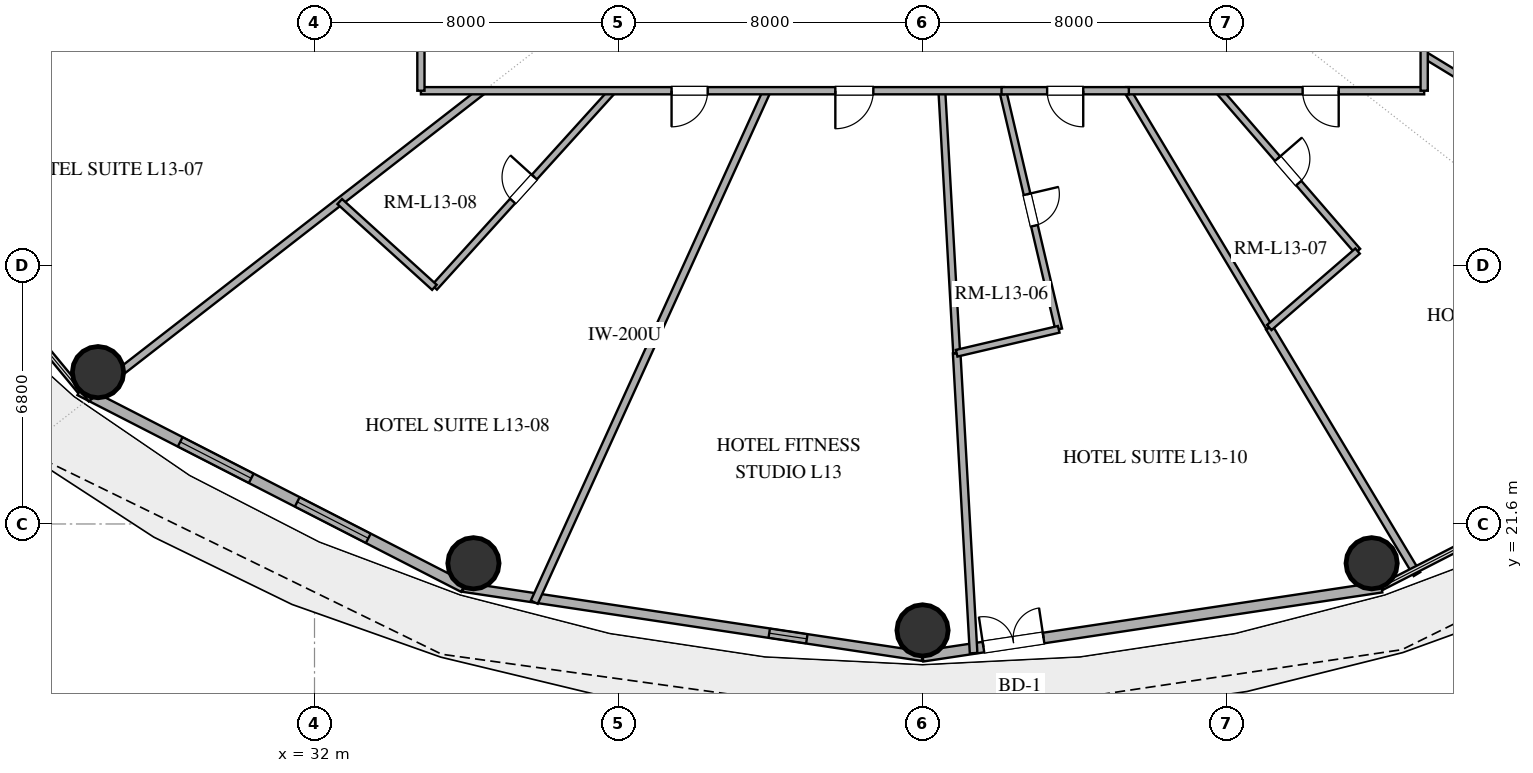
"""IFC4 building model, lengths in metres.
Left out: names, types, materials, properties, quantities, classifications, styles, units other than length and angle.
Written with IfcOpenShell. Run it as: python <this file> out.ifc"""

import sys

from ifc_helpers import new_model, si_unit, direction, frame, frame_2d, origin, origin_2d, place, context, subcontext, project, spatial, rectangle, hollow_circle, extrude, element, fill, save


model = new_model("IFC4")
c1 = context("Model", 3, precision=1e-05, world=origin(), true_north=direction((0.0, 1.0)))
c2 = subcontext(c1, "Body", "Model", "MODEL_VIEW")
j1 = project(units=[si_unit("LENGTHUNIT", "METRE"), si_unit("PLANEANGLEUNIT", "RADIAN")], contexts=[c1])
p1 = place(None, origin())
s1 = spatial("IfcSite", under=j1, at=p1, CompositionType="ELEMENT")
p2 = place(p1, origin())
s2 = spatial("IfcBuilding", under=s1, at=p2, CompositionType="ELEMENT")
p3 = place(p2, frame((0.0, 0.0, 57.0)))
s3 = spatial("IfcBuildingStorey", under=s2, at=p3, CompositionType="ELEMENT", Elevation=57.0)
for number, where, z_axis, x_axis in (
    (1, (26.303, 25.595, 0.0), (0.0, 0.0, 1.0), (1.0, 0.0, 0.0)),
    (2, (36.182, 20.566, 0.0), (0.0, 0.0, 1.0), (1.0, 0.0, 0.0)),
    (3, (48.0, 18.8, 0.0), (0.0, 0.0, 1.0), (1.0, 0.0, 0.0)),
    (4, (59.818, 20.566, 0.0), (0.0, 0.0, 1.0), (1.0, 0.0, 0.0)),
):
    element("IfcColumn", number, at=place(p3, frame(where, z_axis=z_axis, x_axis=x_axis)), inside=s3, PredefinedType="COLUMN", context=c2, shape_type="SweptSolid", body=[
        extrude(hollow_circle(Radius=0.675, WallThickness=0.036, at=origin_2d()), origin(), (0.0, 0.0, 1.0), 3.38),
    ])
p4 = place(p3, frame((25.826, 25.114, 0.0), z_axis=(0.0, 0.0, 1.0), x_axis=(0.889853976658, -0.456245438581, 0.0)))
e5 = element("IfcWall", 5, at=p4, inside=s3, PredefinedType="SOLIDWALL", context=c2, shape_type="SweptSolid", body=[
    extrude(rectangle(XDim=11.346, YDim=0.28, at=frame_2d((5.673, 0.0))), origin(), (0.0, 0.0, 1.0), 3.38),
])
p5 = place(p4, frame((2.967, 0.0, 0.85)))
e6 = element("IfcOpeningElement", 6, at=p5, cuts=e5, PredefinedType="OPENING", context=c2, shape_type="SweptSolid", body=[
    extrude(rectangle(XDim=2.1, YDim=2.2, at=frame_2d((1.05, 1.1))), frame((0.0, 0.15, 0.0), z_axis=(0.0, -1.0, 0.0), x_axis=(1.0, 0.0, 0.0)), (0.0, 0.0, 1.0), 0.3),
])
p6 = place(p4, frame((6.429, 0.0, 0.85)))
e7 = element("IfcOpeningElement", 7, at=p6, cuts=e5, PredefinedType="OPENING", context=c2, shape_type="SweptSolid", body=[
    extrude(rectangle(XDim=2.1, YDim=2.2, at=frame_2d((1.05, 1.1))), frame((0.0, 0.15, 0.0), z_axis=(0.0, -1.0, 0.0), x_axis=(1.0, 0.0, 0.0)), (0.0, 0.0, 1.0), 0.3),
])
p7 = place(p3, frame((35.922, 19.938, 0.0), z_axis=(0.0, 0.0, 1.0), x_axis=(0.988864835849, -0.148816452121, 0.0)))
e8 = element("IfcWall", 8, at=p7, inside=s3, PredefinedType="SOLIDWALL", context=c2, shape_type="SweptSolid", body=[
    extrude(rectangle(XDim=12.214, YDim=0.25, at=frame_2d((6.107, 0.0))), origin(), (0.0, 0.0, 1.0), 3.38),
])
p8 = place(p7, frame((8.135, 0.0, 1.42)))
e9 = element("IfcOpeningElement", 9, at=p8, cuts=e8, PredefinedType="OPENING", context=c2, shape_type="SweptSolid", body=[
    extrude(rectangle(XDim=1.0, YDim=1.05, at=frame_2d((0.5, 0.525))), frame((0.0, 0.135, 0.0), z_axis=(0.0, -1.0, 0.0), x_axis=(1.0, 0.0, 0.0)), (0.0, 0.0, 1.0), 0.27),
])
p9 = place(p3, frame((48.0, 18.12, 0.0), z_axis=(0.0, 0.0, 1.0), x_axis=(0.988864835849, 0.148816452121, 0.0)))
e10 = element("IfcWall", 10, at=p9, inside=s3, PredefinedType="SOLIDWALL", context=c2, shape_type="SweptSolid", body=[
    extrude(rectangle(XDim=12.214, YDim=0.28, at=frame_2d((6.107, 0.0))), origin(), (0.0, 0.0, 1.0), 3.38),
])
p10 = place(p9, frame((1.621, 0.0, 0.0)))
e11 = element("IfcOpeningElement", 11, at=p10, cuts=e10, PredefinedType="OPENING", context=c2, shape_type="SweptSolid", body=[
    extrude(rectangle(XDim=1.6, YDim=2.25, at=frame_2d((0.8, 1.125))), frame((0.0, 0.15, 0.0), z_axis=(0.0, -1.0, 0.0), x_axis=(1.0, 0.0, 0.0)), (0.0, 0.0, 1.0), 0.3),
])
p11 = place(p3, frame((37.783, 19.541, 0.0), z_axis=(0.0, 0.0, 1.0), x_axis=(0.414087801136, 0.910236943301, 0.0)))
e12 = element("IfcWall", 12, at=p11, inside=s3, PredefinedType="PARTITIONING", context=c2, shape_type="SweptSolid", body=[
    extrude(rectangle(XDim=14.786, YDim=0.2, at=frame_2d((7.393, 0.0))), origin(), (0.0, 0.0, 1.0), 2.74),
])
p12 = place(p3, frame((36.417, 33.0, 0.0), z_axis=(0.0, 0.0, 1.0), x_axis=(-0.789656987139, -0.613548565855, 0.0)))
e13 = element("IfcWall", 13, at=p12, inside=s3, PredefinedType="PARTITIONING", context=c2, shape_type="SweptSolid", body=[
    extrude(rectangle(XDim=13.195, YDim=0.2, at=frame_2d((6.597, 0.0))), origin(), (0.0, 0.0, 1.0), 2.74),
])
p13 = place(p3, frame((49.344, 18.201, 0.0), z_axis=(0.0, 0.0, 1.0), x_axis=(-0.056375038978, 0.998409662904, 0.0)))
e14 = element("IfcWall", 14, at=p13, inside=s3, PredefinedType="PARTITIONING", context=c2, shape_type="SweptSolid", body=[
    extrude(rectangle(XDim=7.903, YDim=0.2, at=frame_2d((3.952, 0.0))), origin(), (0.0, 0.0, 1.0), 2.74),
])
p14 = place(p3, frame((61.01, 20.281, 0.0), z_axis=(0.0, 0.0, 1.0), x_axis=(-0.513892719639, 0.857854458928, 0.0)))
e15 = element("IfcWall", 15, at=p14, inside=s3, PredefinedType="PARTITIONING", context=c2, shape_type="SweptSolid", body=[
    extrude(rectangle(XDim=7.563, YDim=0.2, at=frame_2d((3.781, 0.0))), origin(), (0.0, 0.0, 1.0), 2.74),
])
p15 = place(p3, frame((57.124, 26.769, 0.0), z_axis=(0.0, 0.0, 1.0), x_axis=(-0.513872793929, 0.857866394994, 0.0)))
e16 = element("IfcWall", 16, at=p15, inside=s3, PredefinedType="PLUMBINGWALL", context=c2, shape_type="SweptSolid", body=[
    extrude(rectangle(XDim=7.263, YDim=0.18, at=frame_2d((3.632, 0.0))), origin(), (0.0, 0.0, 1.0), 2.74),
])
p16 = place(p3, frame((35.155, 27.826, 0.0), z_axis=(0.0, 0.0, 1.0), x_axis=(0.671533822983, 0.740973902773, 0.0)))
e17 = element("IfcWall", 17, at=p16, inside=s3, PredefinedType="PLUMBINGWALL", context=c2, shape_type="SweptSolid", body=[
    extrude(rectangle(XDim=6.982, YDim=0.18, at=frame_2d((3.491, 0.0))), origin(), (0.0, 0.0, 1.0), 2.74),
])
p17 = place(p16, frame((3.066, 0.0, 0.0)))
e18 = element("IfcOpeningElement", 18, at=p17, cuts=e17, PredefinedType="OPENING", context=c2, shape_type="SweptSolid", body=[
    extrude(rectangle(XDim=0.85, YDim=2.1, at=frame_2d((0.425, 1.05))), frame((0.0, 0.1, 0.0), z_axis=(0.0, -1.0, 0.0), x_axis=(1.0, 0.0, 0.0)), (0.0, 0.0, 1.0), 0.2),
])
p18 = place(p3, frame((48.898, 26.092, 0.0), z_axis=(0.0, 0.0, 1.0), x_axis=(-0.056353367692, 0.998410886334, 0.0)))
e19 = element("IfcWall", 19, at=p18, inside=s3, PredefinedType="PLUMBINGWALL", context=c2, shape_type="SweptSolid", body=[
    extrude(rectangle(XDim=6.919, YDim=0.18, at=frame_2d((3.459, 0.0))), origin(), (0.0, 0.0, 1.0), 2.74),
])
p19 = place(p3, frame((50.111, 33.0, 0.0), z_axis=(0.0, 0.0, 1.0), x_axis=(0.228380862789, -0.973571867666, 0.0)))
e20 = element("IfcWall", 20, at=p19, inside=s3, PredefinedType="PLUMBINGWALL", context=c2, shape_type="SweptSolid", body=[
    extrude(rectangle(XDim=6.448, YDim=0.18, at=frame_2d((3.224, 0.0))), origin(), (0.0, 0.0, 1.0), 2.74),
])
p20 = place(p19, frame((2.799, 0.0, 0.0)))
e21 = element("IfcOpeningElement", 21, at=p20, cuts=e20, PredefinedType="OPENING", context=c2, shape_type="SweptSolid", body=[
    extrude(rectangle(XDim=0.85, YDim=2.1, at=frame_2d((0.425, 1.05))), frame((0.0, 0.1, 0.0), z_axis=(0.0, -1.0, 0.0), x_axis=(1.0, 0.0, 0.0)), (0.0, 0.0, 1.0), 0.2),
])
p21 = place(p3, frame((66.323, 30.822, 0.0), z_axis=(0.0, 0.0, 1.0), x_axis=(-0.853693843866, 0.52077521153, 0.0)))
e22 = element("IfcWall", 22, at=p21, inside=s3, PredefinedType="PLUMBINGWALL", context=c2, shape_type="SweptSolid", body=[
    extrude(rectangle(XDim=6.002, YDim=0.18, at=frame_2d((3.001, 0.0))), origin(), (0.0, 0.0, 1.0), 2.74),
])
p22 = place(p3, frame((55.794, 33.0, 0.0), z_axis=(0.0, 0.0, 1.0), x_axis=(0.654630697525, -0.755948840767, 0.0)))
e23 = element("IfcWall", 23, at=p22, inside=s3, PredefinedType="PLUMBINGWALL", context=c2, shape_type="SweptSolid", body=[
    extrude(rectangle(XDim=5.581, YDim=0.18, at=frame_2d((2.791, 0.0))), origin(), (0.0, 0.0, 1.0), 2.74),
])
p23 = place(p22, frame((2.365, 0.0, 0.0)))
e24 = element("IfcOpeningElement", 24, at=p23, cuts=e23, PredefinedType="OPENING", context=c2, shape_type="SweptSolid", body=[
    extrude(rectangle(XDim=0.85, YDim=2.1, at=frame_2d((0.425, 1.05))), frame((0.0, 0.1, 0.0), z_axis=(0.0, -1.0, 0.0), x_axis=(1.0, 0.0, 0.0)), (0.0, 0.0, 1.0), 0.2),
])
p24 = place(p3, frame((61.2, 33.0, 0.0), z_axis=(0.0, 0.0, 1.0), x_axis=(-1.0, 0.0, 0.0)))
e25 = element("IfcWall", 25, at=p24, inside=s3, PredefinedType="PARTITIONING", context=c2, shape_type="SweptSolid", body=[
    extrude(rectangle(XDim=7.846, YDim=0.19, at=frame_2d((3.923, 0.0))), origin(), (0.0, 0.0, 1.0), 2.74),
])
p25 = place(p24, frame((2.249, 0.0, 0.0)))
e26 = element("IfcOpeningElement", 26, at=p25, cuts=e25, PredefinedType="OPENING", context=c2, shape_type="SweptSolid", body=[
    extrude(rectangle(XDim=0.95, YDim=2.15, at=frame_2d((0.475, 1.075))), frame((0.0, 0.105, 0.0), z_axis=(0.0, -1.0, 0.0), x_axis=(1.0, 0.0, 0.0)), (0.0, 0.0, 1.0), 0.21),
])
p26 = place(p3, frame((50.144, 33.0, 0.0), z_axis=(0.0, 0.0, 1.0), x_axis=(-1.0, 0.0, 0.0)))
e27 = element("IfcWall", 27, at=p26, inside=s3, PredefinedType="PARTITIONING", context=c2, shape_type="SweptSolid", body=[
    extrude(rectangle(XDim=15.344, YDim=0.19, at=frame_2d((7.672, 0.0))), origin(), (0.0, 0.0, 1.0), 2.74),
])
p27 = place(p26, frame((3.438, 0.0, 0.0)))
e28 = element("IfcOpeningElement", 28, at=p27, cuts=e27, PredefinedType="OPENING", context=c2, shape_type="SweptSolid", body=[
    extrude(rectangle(XDim=1.0, YDim=2.2, at=frame_2d((0.5, 1.1))), frame((0.0, 0.105, 0.0), z_axis=(0.0, -1.0, 0.0), x_axis=(1.0, 0.0, 0.0)), (0.0, 0.0, 1.0), 0.21),
])
p28 = place(p26, frame((7.798, 0.0, 0.0)))
e29 = element("IfcOpeningElement", 29, at=p28, cuts=e27, PredefinedType="OPENING", context=c2, shape_type="SweptSolid", body=[
    extrude(rectangle(XDim=0.95, YDim=2.15, at=frame_2d((0.475, 1.075))), frame((0.0, 0.105, 0.0), z_axis=(0.0, -1.0, 0.0), x_axis=(1.0, 0.0, 0.0)), (0.0, 0.0, 1.0), 0.21),
])
p29 = place(p3, frame((61.2, 41.18, 0.0), z_axis=(0.0, 0.0, 1.0), x_axis=(0.0, -1.0, 0.0)))
e30 = element("IfcWall", 30, at=p29, inside=s3, PredefinedType="PARTITIONING", context=c2, shape_type="SweptSolid", body=[
    extrude(rectangle(XDim=8.18, YDim=0.19, at=frame_2d((4.09, 0.0))), origin(), (0.0, 0.0, 1.0), 2.74),
])
p30 = place(p29, frame((1.721, 0.0, 0.0)))
e31 = element("IfcOpeningElement", 31, at=p30, cuts=e30, PredefinedType="OPENING", context=c2, shape_type="SweptSolid", body=[
    extrude(rectangle(XDim=0.95, YDim=2.15, at=frame_2d((0.475, 1.075))), frame((0.0, 0.105, 0.0), z_axis=(0.0, -1.0, 0.0), x_axis=(1.0, 0.0, 0.0)), (0.0, 0.0, 1.0), 0.21),
])
p31 = place(p3, frame((34.8, 33.0, 0.0), z_axis=(0.0, 0.0, 1.0), x_axis=(0.0, 1.0, 0.0)))
e32 = element("IfcWall", 32, at=p31, inside=s3, PredefinedType="PARTITIONING", context=c2, shape_type="SweptSolid", body=[
    extrude(rectangle(XDim=6.668, YDim=0.19, at=frame_2d((3.334, 0.0))), origin(), (0.0, 0.0, 1.0), 2.74),
])
p32 = place(p31, frame((1.624, 0.0, 0.0)))
e33 = element("IfcOpeningElement", 33, at=p32, cuts=e32, PredefinedType="OPENING", context=c2, shape_type="SweptSolid", body=[
    extrude(rectangle(XDim=0.95, YDim=2.15, at=frame_2d((0.475, 1.075))), frame((0.0, 0.105, 0.0), z_axis=(0.0, -1.0, 0.0), x_axis=(1.0, 0.0, 0.0)), (0.0, 0.0, 1.0), 0.21),
])
p33 = place(p3, frame((32.664, 30.084, 0.0), z_axis=(0.0, 0.0, 1.0), x_axis=(0.740964368308, -0.67154434321, 0.0)))
e34 = element("IfcWall", 34, at=p33, inside=s3, PredefinedType="PLUMBINGWALL", context=c2, shape_type="SweptSolid", body=[
    extrude(rectangle(XDim=3.362, YDim=0.18, at=frame_2d((1.681, 0.0))), origin(), (0.0, 0.0, 1.0), 2.74),
])
p34 = place(p3, frame((53.429, 33.0, 0.0), z_axis=(0.0, 0.0, 1.0), x_axis=(-1.0, 0.0, 0.0)))
e35 = element("IfcWall", 35, at=p34, inside=s3, PredefinedType="PARTITIONING", context=c2, shape_type="SweptSolid", body=[
    extrude(rectangle(XDim=3.351, YDim=0.19, at=frame_2d((1.675, 0.0))), origin(), (0.0, 0.0, 1.0), 2.74),
])
p35 = place(p34, frame((1.2, 0.0, 0.0)))
e36 = element("IfcOpeningElement", 36, at=p35, cuts=e35, PredefinedType="OPENING", context=c2, shape_type="SweptSolid", body=[
    extrude(rectangle(XDim=0.95, YDim=2.15, at=frame_2d((0.475, 1.075))), frame((0.0, 0.105, 0.0), z_axis=(0.0, -1.0, 0.0), x_axis=(1.0, 0.0, 0.0)), (0.0, 0.0, 1.0), 0.21),
])
p36 = place(p3, frame((59.447, 28.781, 0.0), z_axis=(0.0, 0.0, 1.0), x_axis=(-0.755927521829, -0.654655315217, 0.0)))
e37 = element("IfcWall", 37, at=p36, inside=s3, PredefinedType="PLUMBINGWALL", context=c2, shape_type="SweptSolid", body=[
    extrude(rectangle(XDim=3.074, YDim=0.18, at=frame_2d((1.537, 0.0))), origin(), (0.0, 0.0, 1.0), 2.74),
])
p37 = place(p3, frame((51.583, 26.722, 0.0), z_axis=(0.0, 0.0, 1.0), x_axis=(-0.973579428385, -0.228348629567, 0.0)))
e38 = element("IfcWall", 38, at=p37, inside=s3, PredefinedType="PLUMBINGWALL", context=c2, shape_type="SweptSolid", body=[
    extrude(rectangle(XDim=2.759, YDim=0.18, at=frame_2d((1.379, 0.0))), origin(), (0.0, 0.0, 1.0), 2.74),
])
p38 = place(p5, origin())
e39 = element("IfcWindow", 39, at=p38, inside=s3, PartitioningType="SINGLE_PANEL", PredefinedType="WINDOW", context=c2, shape_type="SweptSolid", body=[
    extrude(rectangle(XDim=2.1, YDim=2.2, at=frame_2d((1.05, 1.1))), frame((0.0, 0.03, 0.0), z_axis=(0.0, -1.0, 0.0), x_axis=(1.0, 0.0, 0.0)), (0.0, 0.0, 1.0), 0.06),
])
fill(e6, e39)
p39 = place(p6, origin())
e40 = element("IfcWindow", 40, at=p39, inside=s3, PartitioningType="SINGLE_PANEL", PredefinedType="WINDOW", context=c2, shape_type="SweptSolid", body=[
    extrude(rectangle(XDim=2.1, YDim=2.2, at=frame_2d((1.05, 1.1))), frame((0.0, 0.03, 0.0), z_axis=(0.0, -1.0, 0.0), x_axis=(1.0, 0.0, 0.0)), (0.0, 0.0, 1.0), 0.06),
])
fill(e7, e40)
p40 = place(p10, origin())
e41 = element("IfcDoor", 41, at=p40, inside=s3, OperationType="DOUBLE_DOOR_SINGLE_SWING", PredefinedType="DOOR", context=c2, shape_type="SweptSolid", body=[
    extrude(rectangle(XDim=1.6, YDim=2.25, at=frame_2d((0.8, 1.125))), frame((0.0, 0.025, 0.0), z_axis=(0.0, -1.0, 0.0), x_axis=(1.0, 0.0, 0.0)), (0.0, 0.0, 1.0), 0.05),
])
fill(e11, e41)
p41 = place(p8, origin())
e42 = element("IfcWindow", 42, at=p41, inside=s3, PartitioningType="SINGLE_PANEL", PredefinedType="WINDOW", context=c2, shape_type="SweptSolid", body=[
    extrude(rectangle(XDim=1.0, YDim=1.05, at=frame_2d((0.5, 0.525))), frame((0.0, 0.03, 0.0), z_axis=(0.0, -1.0, 0.0), x_axis=(1.0, 0.0, 0.0)), (0.0, 0.0, 1.0), 0.06),
])
fill(e9, e42)
p42 = place(p17, origin())
e43 = element("IfcDoor", 43, at=p42, inside=s3, OperationType="SINGLE_SWING_RIGHT", PredefinedType="DOOR", context=c2, shape_type="SweptSolid", body=[
    extrude(rectangle(XDim=0.85, YDim=2.1, at=frame_2d((0.425, 1.05))), frame((0.0, 0.025, 0.0), z_axis=(0.0, -1.0, 0.0), x_axis=(1.0, 0.0, 0.0)), (0.0, 0.0, 1.0), 0.05),
])
fill(e18, e43)
p43 = place(p20, origin())
e44 = element("IfcDoor", 44, at=p43, inside=s3, OperationType="SINGLE_SWING_LEFT", PredefinedType="DOOR", context=c2, shape_type="SweptSolid", body=[
    extrude(rectangle(XDim=0.85, YDim=2.1, at=frame_2d((0.425, 1.05))), frame((0.0, 0.025, 0.0), z_axis=(0.0, -1.0, 0.0), x_axis=(1.0, 0.0, 0.0)), (0.0, 0.0, 1.0), 0.05),
])
fill(e21, e44)
p44 = place(p23, origin())
e45 = element("IfcDoor", 45, at=p44, inside=s3, OperationType="SINGLE_SWING_LEFT", PredefinedType="DOOR", context=c2, shape_type="SweptSolid", body=[
    extrude(rectangle(XDim=0.85, YDim=2.1, at=frame_2d((0.425, 1.05))), frame((0.0, 0.025, 0.0), z_axis=(0.0, -1.0, 0.0), x_axis=(1.0, 0.0, 0.0)), (0.0, 0.0, 1.0), 0.05),
])
fill(e24, e45)
p45 = place(p25, origin())
e46 = element("IfcDoor", 46, at=p45, inside=s3, OperationType="SINGLE_SWING_LEFT", PredefinedType="DOOR", context=c2, shape_type="SweptSolid", body=[
    extrude(rectangle(XDim=0.95, YDim=2.15, at=frame_2d((0.475, 1.075))), frame((0.0, 0.025, 0.0), z_axis=(0.0, -1.0, 0.0), x_axis=(1.0, 0.0, 0.0)), (0.0, 0.0, 1.0), 0.05),
])
fill(e26, e46)
p46 = place(p27, origin())
e47 = element("IfcDoor", 47, at=p46, inside=s3, OperationType="SINGLE_SWING_RIGHT", PredefinedType="DOOR", context=c2, shape_type="SweptSolid", body=[
    extrude(rectangle(XDim=1.0, YDim=2.2, at=frame_2d((0.5, 1.1))), frame((0.0, 0.025, 0.0), z_axis=(0.0, -1.0, 0.0), x_axis=(1.0, 0.0, 0.0)), (0.0, 0.0, 1.0), 0.05),
])
fill(e28, e47)
p47 = place(p28, origin())
e48 = element("IfcDoor", 48, at=p47, inside=s3, OperationType="SINGLE_SWING_RIGHT", PredefinedType="DOOR", context=c2, shape_type="SweptSolid", body=[
    extrude(rectangle(XDim=0.95, YDim=2.15, at=frame_2d((0.475, 1.075))), frame((0.0, 0.025, 0.0), z_axis=(0.0, -1.0, 0.0), x_axis=(1.0, 0.0, 0.0)), (0.0, 0.0, 1.0), 0.05),
])
fill(e29, e48)
p48 = place(p35, origin())
e49 = element("IfcDoor", 49, at=p48, inside=s3, OperationType="SINGLE_SWING_LEFT", PredefinedType="DOOR", context=c2, shape_type="SweptSolid", body=[
    extrude(rectangle(XDim=0.95, YDim=2.15, at=frame_2d((0.475, 1.075))), frame((0.0, 0.025, 0.0), z_axis=(0.0, -1.0, 0.0), x_axis=(1.0, 0.0, 0.0)), (0.0, 0.0, 1.0), 0.05),
])
fill(e36, e49)
save(model, sys.argv[1])
